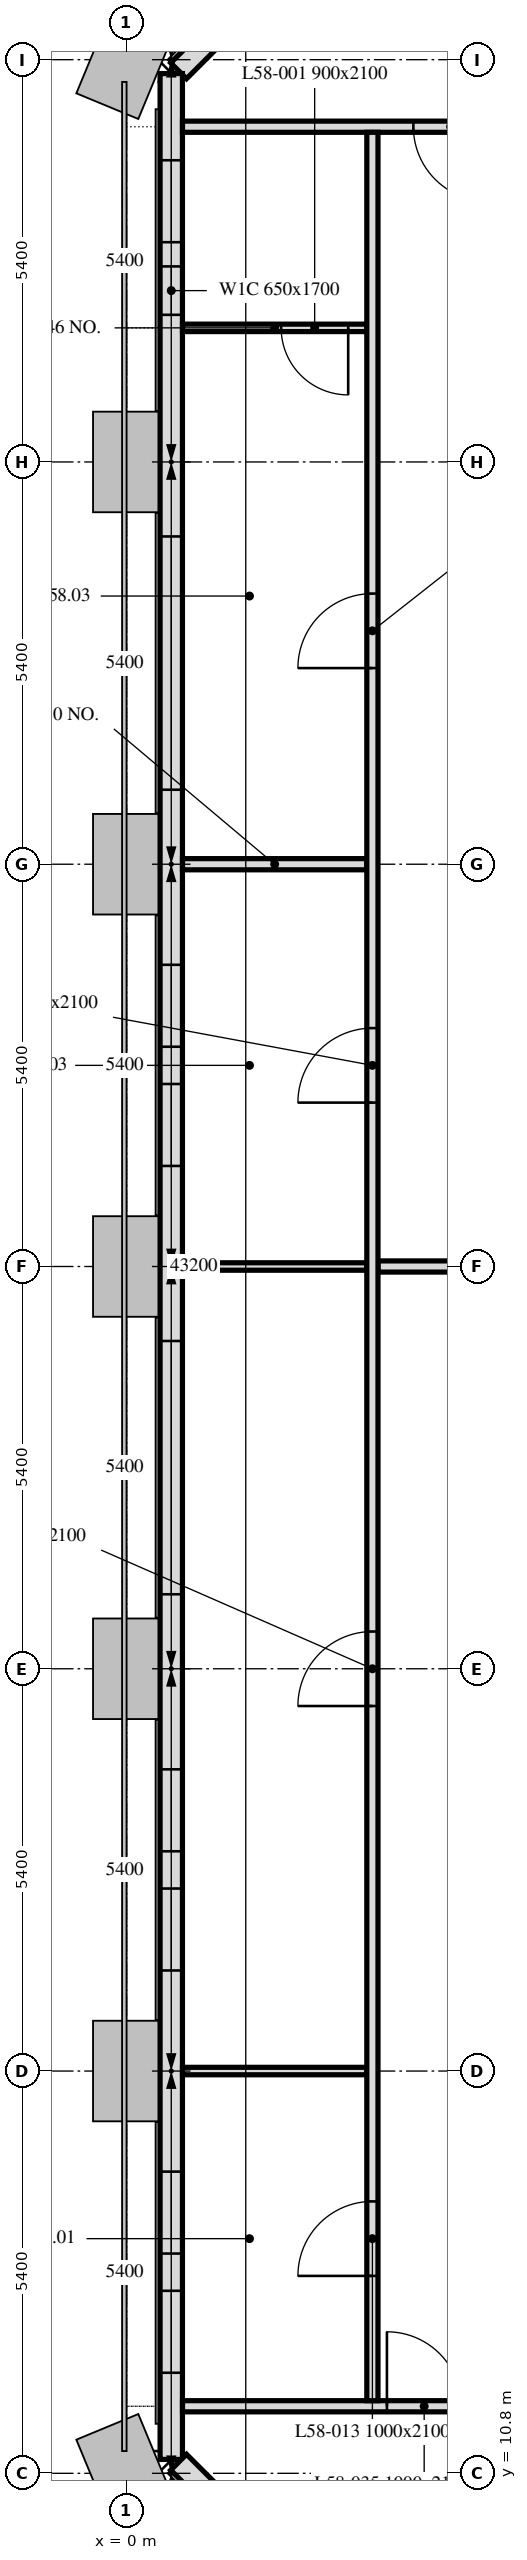
"""IFC4 building model, lengths in metres.
Left out: names, types, materials, properties, quantities, classifications, styles, units other than length and angle.
Written with IfcOpenShell. Run it as: python <this file> out.ifc"""

import sys

from ifc_helpers import new_model, si_unit, direction, frame, frame_2d, origin, place, context, subcontext, project, spatial, rectangle, extrude, element, fill, save


model = new_model("IFC4")
c1 = context("Model", 3, precision=1e-05, world=origin(), true_north=direction((0.0, 1.0)))
c2 = subcontext(c1, "Body", "Model", "MODEL_VIEW")
j1 = project(units=[si_unit("LENGTHUNIT", "METRE"), si_unit("PLANEANGLEUNIT", "RADIAN")], contexts=[c1])
p1 = place(None, origin())
s1 = spatial("IfcSite", under=j1, at=p1, CompositionType="ELEMENT")
p2 = place(p1, origin())
s2 = spatial("IfcBuilding", under=s1, at=p2, CompositionType="ELEMENT")
p3 = place(p2, frame((0.0, 0.0, 230.2)))
s3 = spatial("IfcBuildingStorey", under=s2, at=p3, CompositionType="ELEMENT", Elevation=230.2)
p4 = place(p3, frame((5.55, 47.901, 0.0), z_axis=(0.0, 0.0, 1.0), x_axis=(-0.707106781187, -0.707106781187, 0.0)))
e1 = element("IfcWall", 1, at=p4, inside=s3, PredefinedType="SOLIDWALL", context=c2, shape_type="SweptSolid", body=[
    extrude(rectangle(XDim=6.86, YDim=0.3, at=frame_2d((3.43, 0.0))), origin(), (0.0, 0.0, 1.0), 2.8),
])
p5 = place(p4, frame((1.28, 0.0, 0.9)))
e2 = element("IfcOpeningElement", 2, at=p5, cuts=e1, PredefinedType="OPENING", context=c2, shape_type="SweptSolid", body=[
    extrude(rectangle(XDim=1.1, YDim=1.7, at=frame_2d((0.55, 0.85))), frame((0.0, 0.16, 0.0), z_axis=(0.0, -1.0, 0.0), x_axis=(1.0, 0.0, 0.0)), (0.0, 0.0, 1.0), 0.32),
])
p6 = place(p4, frame((4.48, 0.0, 0.9)))
e3 = element("IfcOpeningElement", 3, at=p6, cuts=e1, PredefinedType="OPENING", context=c2, shape_type="SweptSolid", body=[
    extrude(rectangle(XDim=1.1, YDim=1.7, at=frame_2d((0.55, 0.85))), frame((0.0, 0.16, 0.0), z_axis=(0.0, -1.0, 0.0), x_axis=(1.0, 0.0, 0.0)), (0.0, 0.0, 1.0), 0.32),
])
p7 = place(p3, frame((0.6, 43.014, 0.0), z_axis=(0.0, 0.0, 1.0), x_axis=(0.0, -1.0, 0.0)))
e4 = element("IfcWall", 4, at=p7, inside=s3, PredefinedType="SOLIDWALL", context=c2, shape_type="SweptSolid", body=[
    extrude(rectangle(XDim=32.027, YDim=0.3, at=frame_2d((16.014, 0.0))), origin(), (0.0, 0.0, 1.0), 2.8),
])
p8 = place(p7, frame((1.164, 0.0, 0.9)))
e5 = element("IfcOpeningElement", 5, at=p8, cuts=e4, PredefinedType="OPENING", context=c2, shape_type="SweptSolid", body=[
    extrude(rectangle(XDim=1.1, YDim=1.7, at=frame_2d((0.55, 0.85))), frame((0.0, 0.16, 0.0), z_axis=(0.0, -1.0, 0.0), x_axis=(1.0, 0.0, 0.0)), (0.0, 0.0, 1.0), 0.32),
])
p9 = place(p7, frame((2.589, 0.0, 0.9)))
e6 = element("IfcOpeningElement", 6, at=p9, cuts=e4, PredefinedType="OPENING", context=c2, shape_type="SweptSolid", body=[
    extrude(rectangle(XDim=0.65, YDim=1.7, at=frame_2d((0.325, 0.85))), frame((0.0, 0.16, 0.0), z_axis=(0.0, -1.0, 0.0), x_axis=(1.0, 0.0, 0.0)), (0.0, 0.0, 1.0), 0.32),
])
p10 = place(p7, frame((6.214, 0.0, 0.9)))
e7 = element("IfcOpeningElement", 7, at=p10, cuts=e4, PredefinedType="OPENING", context=c2, shape_type="SweptSolid", body=[
    extrude(rectangle(XDim=3.4, YDim=1.7, at=frame_2d((1.7, 0.85))), frame((0.0, 0.16, 0.0), z_axis=(0.0, -1.0, 0.0), x_axis=(1.0, 0.0, 0.0)), (0.0, 0.0, 1.0), 0.32),
])
p11 = place(p7, frame((11.964, 0.0, 0.9)))
e8 = element("IfcOpeningElement", 8, at=p11, cuts=e4, PredefinedType="OPENING", context=c2, shape_type="SweptSolid", body=[
    extrude(rectangle(XDim=1.1, YDim=1.7, at=frame_2d((0.55, 0.85))), frame((0.0, 0.16, 0.0), z_axis=(0.0, -1.0, 0.0), x_axis=(1.0, 0.0, 0.0)), (0.0, 0.0, 1.0), 0.32),
])
p12 = place(p7, frame((13.564, 0.0, 0.9)))
e9 = element("IfcOpeningElement", 9, at=p12, cuts=e4, PredefinedType="OPENING", context=c2, shape_type="SweptSolid", body=[
    extrude(rectangle(XDim=1.1, YDim=1.7, at=frame_2d((0.55, 0.85))), frame((0.0, 0.16, 0.0), z_axis=(0.0, -1.0, 0.0), x_axis=(1.0, 0.0, 0.0)), (0.0, 0.0, 1.0), 0.32),
])
p13 = place(p7, frame((17.014, 0.0, 0.9)))
e10 = element("IfcOpeningElement", 10, at=p13, cuts=e4, PredefinedType="OPENING", context=c2, shape_type="SweptSolid", body=[
    extrude(rectangle(XDim=3.4, YDim=1.7, at=frame_2d((1.7, 0.85))), frame((0.0, 0.16, 0.0), z_axis=(0.0, -1.0, 0.0), x_axis=(1.0, 0.0, 0.0)), (0.0, 0.0, 1.0), 0.32),
])
p14 = place(p7, frame((22.764, 0.0, 0.9)))
e11 = element("IfcOpeningElement", 11, at=p14, cuts=e4, PredefinedType="OPENING", context=c2, shape_type="SweptSolid", body=[
    extrude(rectangle(XDim=1.1, YDim=1.7, at=frame_2d((0.55, 0.85))), frame((0.0, 0.16, 0.0), z_axis=(0.0, -1.0, 0.0), x_axis=(1.0, 0.0, 0.0)), (0.0, 0.0, 1.0), 0.32),
])
p15 = place(p7, frame((24.364, 0.0, 0.9)))
e12 = element("IfcOpeningElement", 12, at=p15, cuts=e4, PredefinedType="OPENING", context=c2, shape_type="SweptSolid", body=[
    extrude(rectangle(XDim=1.1, YDim=1.7, at=frame_2d((0.55, 0.85))), frame((0.0, 0.16, 0.0), z_axis=(0.0, -1.0, 0.0), x_axis=(1.0, 0.0, 0.0)), (0.0, 0.0, 1.0), 0.32),
])
p16 = place(p7, frame((28.164, 0.0, 0.9)))
e13 = element("IfcOpeningElement", 13, at=p16, cuts=e4, PredefinedType="OPENING", context=c2, shape_type="SweptSolid", body=[
    extrude(rectangle(XDim=1.1, YDim=1.7, at=frame_2d((0.55, 0.85))), frame((0.0, 0.16, 0.0), z_axis=(0.0, -1.0, 0.0), x_axis=(1.0, 0.0, 0.0)), (0.0, 0.0, 1.0), 0.32),
])
p17 = place(p7, frame((29.764, 0.0, 0.9)))
e14 = element("IfcOpeningElement", 14, at=p17, cuts=e4, PredefinedType="OPENING", context=c2, shape_type="SweptSolid", body=[
    extrude(rectangle(XDim=1.1, YDim=1.7, at=frame_2d((0.55, 0.85))), frame((0.0, 0.16, 0.0), z_axis=(0.0, -1.0, 0.0), x_axis=(1.0, 0.0, 0.0)), (0.0, 0.0, 1.0), 0.32),
])
p18 = place(p3, frame((0.699, 10.949, 0.0), z_axis=(0.0, 0.0, 1.0), x_axis=(0.707106781187, -0.707106781187, 0.0)))
e15 = element("IfcWall", 15, at=p18, inside=s3, PredefinedType="SOLIDWALL", context=c2, shape_type="SweptSolid", body=[
    extrude(rectangle(XDim=6.86, YDim=0.3, at=frame_2d((3.43, 0.0))), origin(), (0.0, 0.0, 1.0), 2.8),
])
p19 = place(p18, frame((1.28, 0.0, 0.9)))
e16 = element("IfcOpeningElement", 16, at=p19, cuts=e15, PredefinedType="OPENING", context=c2, shape_type="SweptSolid", body=[
    extrude(rectangle(XDim=1.1, YDim=1.7, at=frame_2d((0.55, 0.85))), frame((0.0, 0.16, 0.0), z_axis=(0.0, -1.0, 0.0), x_axis=(1.0, 0.0, 0.0)), (0.0, 0.0, 1.0), 0.32),
])
p20 = place(p18, frame((4.48, 0.0, 0.9)))
e17 = element("IfcOpeningElement", 17, at=p20, cuts=e15, PredefinedType="OPENING", context=c2, shape_type="SweptSolid", body=[
    extrude(rectangle(XDim=1.1, YDim=1.7, at=frame_2d((0.55, 0.85))), frame((0.0, 0.16, 0.0), z_axis=(0.0, -1.0, 0.0), x_axis=(1.0, 0.0, 0.0)), (0.0, 0.0, 1.0), 0.32),
])
p21 = place(p3, frame((0.751, 32.4, 0.0), z_axis=(0.0, 0.0, 1.0), x_axis=(1.0, 0.0, 0.0)))
e18 = element("IfcWall", 18, at=p21, inside=s3, PredefinedType="PARTITIONING", context=c2, shape_type="SweptSolid", body=[
    extrude(rectangle(XDim=2.474, YDim=0.15, at=frame_2d((1.237, 0.0))), origin(), (0.0, 0.0, 1.0), 2.2),
])
p22 = place(p3, frame((3.225, 39.6, 0.0), z_axis=(0.0, 0.0, 1.0), x_axis=(-1.0, 0.0, 0.0)))
e19 = element("IfcWall", 19, at=p22, inside=s3, PredefinedType="PARTITIONING", context=c2, shape_type="SweptSolid", body=[
    extrude(rectangle(XDim=2.474, YDim=0.1, at=frame_2d((1.237, 0.0))), origin(), (0.0, 0.0, 1.0), 2.8),
])
p23 = place(p22, frame((0.25, 0.0, 0.0)))
e20 = element("IfcOpeningElement", 20, at=p23, cuts=e19, PredefinedType="OPENING", context=c2, shape_type="SweptSolid", body=[
    extrude(rectangle(XDim=0.9, YDim=2.1, at=frame_2d((0.45, 1.05))), frame((0.0, 0.05, 0.0), z_axis=(0.0, -1.0, 0.0), x_axis=(1.0, 0.0, 0.0)), (0.0, 0.0, 1.0), 0.1),
])
p24 = place(p3, frame((42.449, 42.3, 0.0), z_axis=(0.0, 0.0, 1.0), x_axis=(-1.0, 0.0, 0.0)))
e21 = element("IfcWall", 21, at=p24, inside=s3, PredefinedType="PARTITIONING", context=c2, shape_type="SweptSolid", body=[
    extrude(rectangle(XDim=41.698, YDim=0.15, at=frame_2d((20.849, 0.0))), origin(), (0.0, 0.0, 1.0), 2.2),
])
p25 = place(p24, frame((1.132, 0.0, 0.0)))
e22 = element("IfcOpeningElement", 22, at=p25, cuts=e21, PredefinedType="OPENING", context=c2, shape_type="SweptSolid", body=[
    extrude(rectangle(XDim=1.0, YDim=2.1, at=frame_2d((0.5, 1.05))), frame((0.0, 0.075, 0.0), z_axis=(0.0, -1.0, 0.0), x_axis=(1.0, 0.0, 0.0)), (0.0, 0.0, 1.0), 0.15),
])
p26 = place(p24, frame((13.049, 0.0, 0.0)))
e23 = element("IfcOpeningElement", 23, at=p26, cuts=e21, PredefinedType="OPENING", context=c2, shape_type="SweptSolid", body=[
    extrude(rectangle(XDim=1.0, YDim=2.1, at=frame_2d((0.5, 1.05))), frame((0.0, 0.075, 0.0), z_axis=(0.0, -1.0, 0.0), x_axis=(1.0, 0.0, 0.0)), (0.0, 0.0, 1.0), 0.15),
])
p27 = place(p24, frame((18.449, 0.0, 0.0)))
e24 = element("IfcOpeningElement", 24, at=p27, cuts=e21, PredefinedType="OPENING", context=c2, shape_type="SweptSolid", body=[
    extrude(rectangle(XDim=1.0, YDim=2.1, at=frame_2d((0.5, 1.05))), frame((0.0, 0.075, 0.0), z_axis=(0.0, -1.0, 0.0), x_axis=(1.0, 0.0, 0.0)), (0.0, 0.0, 1.0), 0.15),
])
p28 = place(p24, frame((23.049, 0.0, 0.0)))
e25 = element("IfcOpeningElement", 25, at=p28, cuts=e21, PredefinedType="OPENING", context=c2, shape_type="SweptSolid", body=[
    extrude(rectangle(XDim=1.0, YDim=2.1, at=frame_2d((0.5, 1.05))), frame((0.0, 0.075, 0.0), z_axis=(0.0, -1.0, 0.0), x_axis=(1.0, 0.0, 0.0)), (0.0, 0.0, 1.0), 0.15),
])
p29 = place(p24, frame((37.599, 0.0, 0.0)))
e26 = element("IfcOpeningElement", 26, at=p29, cuts=e21, PredefinedType="OPENING", context=c2, shape_type="SweptSolid", body=[
    extrude(rectangle(XDim=1.0, YDim=2.1, at=frame_2d((0.5, 1.05))), frame((0.0, 0.075, 0.0), z_axis=(0.0, -1.0, 0.0), x_axis=(1.0, 0.0, 0.0)), (0.0, 0.0, 1.0), 0.15),
])
p30 = place(p3, frame((0.751, 27.0, 0.0), z_axis=(0.0, 0.0, 1.0), x_axis=(1.0, 0.0, 0.0)))
e27 = element("IfcWall", 27, at=p30, inside=s3, PredefinedType="PARTITIONING", context=c2, shape_type="SweptSolid", body=[
    extrude(rectangle(XDim=2.474, YDim=0.1, at=frame_2d((1.237, 0.0))), origin(), (0.0, 0.0, 1.0), 2.2),
])
p31 = place(p3, frame((3.375, 27.0, 0.0), z_axis=(0.0, 0.0, 1.0), x_axis=(1.0, 0.0, 0.0)))
e28 = element("IfcWall", 28, at=p31, inside=s3, PredefinedType="PARTITIONING", context=c2, shape_type="SweptSolid", body=[
    extrude(rectangle(XDim=2.025, YDim=0.15, at=frame_2d((1.012, 0.0))), origin(), (0.0, 0.0, 1.0), 2.2),
])
p32 = place(p3, frame((3.225, 16.2, 0.0), z_axis=(0.0, 0.0, 1.0), x_axis=(-1.0, 0.0, 0.0)))
e29 = element("IfcWall", 29, at=p32, inside=s3, PredefinedType="PARTITIONING", context=c2, shape_type="SweptSolid", body=[
    extrude(rectangle(XDim=2.474, YDim=0.1, at=frame_2d((1.237, 0.0))), origin(), (0.0, 0.0, 1.0), 2.2),
])
p33 = place(p3, frame((0.751, 11.7, 0.0), z_axis=(0.0, 0.0, 1.0), x_axis=(1.0, 0.0, 0.0)))
e30 = element("IfcWall", 30, at=p33, inside=s3, PredefinedType="PARTITIONING", context=c2, shape_type="SweptSolid", body=[
    extrude(rectangle(XDim=41.698, YDim=0.15, at=frame_2d((20.849, 0.0))), origin(), (0.0, 0.0, 1.0), 2.2),
])
p34 = place(p33, frame((33.866, 0.0, 0.0)))
e31 = element("IfcOpeningElement", 31, at=p34, cuts=e30, PredefinedType="OPENING", context=c2, shape_type="SweptSolid", body=[
    extrude(rectangle(XDim=1.0, YDim=2.1, at=frame_2d((0.5, 1.05))), frame((0.0, 0.075, 0.0), z_axis=(0.0, -1.0, 0.0), x_axis=(1.0, 0.0, 0.0)), (0.0, 0.0, 1.0), 0.15),
])
p35 = place(p33, frame((28.432, 0.0, 0.0)))
e32 = element("IfcOpeningElement", 32, at=p35, cuts=e30, PredefinedType="OPENING", context=c2, shape_type="SweptSolid", body=[
    extrude(rectangle(XDim=1.0, YDim=2.1, at=frame_2d((0.5, 1.05))), frame((0.0, 0.075, 0.0), z_axis=(0.0, -1.0, 0.0), x_axis=(1.0, 0.0, 0.0)), (0.0, 0.0, 1.0), 0.15),
])
p36 = place(p33, frame((12.266, 0.0, 0.0)))
e33 = element("IfcOpeningElement", 33, at=p36, cuts=e30, PredefinedType="OPENING", context=c2, shape_type="SweptSolid", body=[
    extrude(rectangle(XDim=1.0, YDim=2.1, at=frame_2d((0.5, 1.05))), frame((0.0, 0.075, 0.0), z_axis=(0.0, -1.0, 0.0), x_axis=(1.0, 0.0, 0.0)), (0.0, 0.0, 1.0), 0.15),
])
p37 = place(p33, frame((2.744, 0.0, 0.0)))
e34 = element("IfcOpeningElement", 34, at=p37, cuts=e30, PredefinedType="OPENING", context=c2, shape_type="SweptSolid", body=[
    extrude(rectangle(XDim=1.0, YDim=2.1, at=frame_2d((0.5, 1.05))), frame((0.0, 0.075, 0.0), z_axis=(0.0, -1.0, 0.0), x_axis=(1.0, 0.0, 0.0)), (0.0, 0.0, 1.0), 0.15),
])
p38 = place(p3, frame((3.3, 11.775, 0.0), z_axis=(0.0, 0.0, 1.0), x_axis=(0.0, 1.0, 0.0)))
e35 = element("IfcWall", 35, at=p38, inside=s3, PredefinedType="PARTITIONING", context=c2, shape_type="SweptSolid", body=[
    extrude(rectangle(XDim=30.45, YDim=0.15, at=frame_2d((15.225, 0.0))), origin(), (0.0, 0.0, 1.0), 2.2),
])
p39 = place(p38, frame((17.425, 0.0, 0.0)))
e36 = element("IfcOpeningElement", 36, at=p39, cuts=e35, PredefinedType="OPENING", context=c2, shape_type="SweptSolid", body=[
    extrude(rectangle(XDim=1.0, YDim=2.1, at=frame_2d((0.5, 1.05))), frame((0.0, 0.075, 0.0), z_axis=(0.0, -1.0, 0.0), x_axis=(1.0, 0.0, 0.0)), (0.0, 0.0, 1.0), 0.15),
])
p40 = place(p38, frame((1.675, 0.0, 0.0)))
e37 = element("IfcOpeningElement", 37, at=p40, cuts=e35, PredefinedType="OPENING", context=c2, shape_type="SweptSolid", body=[
    extrude(rectangle(XDim=1.0, YDim=2.1, at=frame_2d((0.5, 1.05))), frame((0.0, 0.075, 0.0), z_axis=(0.0, -1.0, 0.0), x_axis=(1.0, 0.0, 0.0)), (0.0, 0.0, 1.0), 0.15),
])
p41 = place(p38, frame((9.325, 0.0, 0.0)))
e38 = element("IfcOpeningElement", 38, at=p41, cuts=e35, PredefinedType="OPENING", context=c2, shape_type="SweptSolid", body=[
    extrude(rectangle(XDim=1.0, YDim=2.1, at=frame_2d((0.5, 1.05))), frame((0.0, 0.075, 0.0), z_axis=(0.0, -1.0, 0.0), x_axis=(1.0, 0.0, 0.0)), (0.0, 0.0, 1.0), 0.15),
])
p42 = place(p38, frame((23.258, 0.0, 0.0)))
e39 = element("IfcOpeningElement", 39, at=p42, cuts=e35, PredefinedType="OPENING", context=c2, shape_type="SweptSolid", body=[
    extrude(rectangle(XDim=1.0, YDim=2.1, at=frame_2d((0.5, 1.05))), frame((0.0, 0.075, 0.0), z_axis=(0.0, -1.0, 0.0), x_axis=(1.0, 0.0, 0.0)), (0.0, 0.0, 1.0), 0.15),
])
p43 = place(p8, origin())
e40 = element("IfcWindow", 40, at=p43, inside=s3, PartitioningType="SINGLE_PANEL", PredefinedType="WINDOW", context=c2, shape_type="SweptSolid", body=[
    extrude(rectangle(XDim=1.1, YDim=1.7, at=frame_2d((0.55, 0.85))), frame((0.0, 0.03, 0.0), z_axis=(0.0, -1.0, 0.0), x_axis=(1.0, 0.0, 0.0)), (0.0, 0.0, 1.0), 0.06),
])
fill(e5, e40)
p44 = place(p9, origin())
e41 = element("IfcWindow", 41, at=p44, inside=s3, PartitioningType="SINGLE_PANEL", PredefinedType="WINDOW", context=c2, shape_type="SweptSolid", body=[
    extrude(rectangle(XDim=0.65, YDim=1.7, at=frame_2d((0.325, 0.85))), frame((0.0, 0.03, 0.0), z_axis=(0.0, -1.0, 0.0), x_axis=(1.0, 0.0, 0.0)), (0.0, 0.0, 1.0), 0.06),
])
fill(e6, e41)
p45 = place(p10, origin())
e42 = element("IfcWindow", 42, at=p45, inside=s3, PartitioningType="SINGLE_PANEL", PredefinedType="WINDOW", context=c2, shape_type="SweptSolid", body=[
    extrude(rectangle(XDim=3.4, YDim=1.7, at=frame_2d((1.7, 0.85))), frame((0.0, 0.03, 0.0), z_axis=(0.0, -1.0, 0.0), x_axis=(1.0, 0.0, 0.0)), (0.0, 0.0, 1.0), 0.06),
])
fill(e7, e42)
p46 = place(p11, origin())
e43 = element("IfcWindow", 43, at=p46, inside=s3, PartitioningType="SINGLE_PANEL", PredefinedType="WINDOW", context=c2, shape_type="SweptSolid", body=[
    extrude(rectangle(XDim=1.1, YDim=1.7, at=frame_2d((0.55, 0.85))), frame((0.0, 0.03, 0.0), z_axis=(0.0, -1.0, 0.0), x_axis=(1.0, 0.0, 0.0)), (0.0, 0.0, 1.0), 0.06),
])
fill(e8, e43)
p47 = place(p12, origin())
e44 = element("IfcWindow", 44, at=p47, inside=s3, PartitioningType="SINGLE_PANEL", PredefinedType="WINDOW", context=c2, shape_type="SweptSolid", body=[
    extrude(rectangle(XDim=1.1, YDim=1.7, at=frame_2d((0.55, 0.85))), frame((0.0, 0.03, 0.0), z_axis=(0.0, -1.0, 0.0), x_axis=(1.0, 0.0, 0.0)), (0.0, 0.0, 1.0), 0.06),
])
fill(e9, e44)
p48 = place(p13, origin())
e45 = element("IfcWindow", 45, at=p48, inside=s3, PartitioningType="SINGLE_PANEL", PredefinedType="WINDOW", context=c2, shape_type="SweptSolid", body=[
    extrude(rectangle(XDim=3.4, YDim=1.7, at=frame_2d((1.7, 0.85))), frame((0.0, 0.03, 0.0), z_axis=(0.0, -1.0, 0.0), x_axis=(1.0, 0.0, 0.0)), (0.0, 0.0, 1.0), 0.06),
])
fill(e10, e45)
p49 = place(p14, origin())
e46 = element("IfcWindow", 46, at=p49, inside=s3, PartitioningType="SINGLE_PANEL", PredefinedType="WINDOW", context=c2, shape_type="SweptSolid", body=[
    extrude(rectangle(XDim=1.1, YDim=1.7, at=frame_2d((0.55, 0.85))), frame((0.0, 0.03, 0.0), z_axis=(0.0, -1.0, 0.0), x_axis=(1.0, 0.0, 0.0)), (0.0, 0.0, 1.0), 0.06),
])
fill(e11, e46)
p50 = place(p15, origin())
e47 = element("IfcWindow", 47, at=p50, inside=s3, PartitioningType="SINGLE_PANEL", PredefinedType="WINDOW", context=c2, shape_type="SweptSolid", body=[
    extrude(rectangle(XDim=1.1, YDim=1.7, at=frame_2d((0.55, 0.85))), frame((0.0, 0.03, 0.0), z_axis=(0.0, -1.0, 0.0), x_axis=(1.0, 0.0, 0.0)), (0.0, 0.0, 1.0), 0.06),
])
fill(e12, e47)
p51 = place(p16, origin())
e48 = element("IfcWindow", 48, at=p51, inside=s3, PartitioningType="SINGLE_PANEL", PredefinedType="WINDOW", context=c2, shape_type="SweptSolid", body=[
    extrude(rectangle(XDim=1.1, YDim=1.7, at=frame_2d((0.55, 0.85))), frame((0.0, 0.03, 0.0), z_axis=(0.0, -1.0, 0.0), x_axis=(1.0, 0.0, 0.0)), (0.0, 0.0, 1.0), 0.06),
])
fill(e13, e48)
p52 = place(p17, origin())
e49 = element("IfcWindow", 49, at=p52, inside=s3, PartitioningType="SINGLE_PANEL", PredefinedType="WINDOW", context=c2, shape_type="SweptSolid", body=[
    extrude(rectangle(XDim=1.1, YDim=1.7, at=frame_2d((0.55, 0.85))), frame((0.0, 0.03, 0.0), z_axis=(0.0, -1.0, 0.0), x_axis=(1.0, 0.0, 0.0)), (0.0, 0.0, 1.0), 0.06),
])
fill(e14, e49)
p53 = place(p23, origin())
e50 = element("IfcDoor", 50, at=p53, inside=s3, OperationType="SINGLE_SWING_RIGHT", PredefinedType="DOOR", context=c2, shape_type="SweptSolid", body=[
    extrude(rectangle(XDim=0.9, YDim=2.1, at=frame_2d((0.45, 1.05))), frame((0.0, 0.025, 0.0), z_axis=(0.0, -1.0, 0.0), x_axis=(1.0, 0.0, 0.0)), (0.0, 0.0, 1.0), 0.05),
])
fill(e20, e50)
p54 = place(p39, origin())
e51 = element("IfcDoor", 51, at=p54, inside=s3, OperationType="SINGLE_SWING_RIGHT", PredefinedType="DOOR", context=c2, shape_type="SweptSolid", body=[
    extrude(rectangle(XDim=1.0, YDim=2.1, at=frame_2d((0.5, 1.05))), frame((0.0, 0.025, 0.0), z_axis=(0.0, -1.0, 0.0), x_axis=(1.0, 0.0, 0.0)), (0.0, 0.0, 1.0), 0.05),
])
fill(e36, e51)
p55 = place(p40, origin())
e52 = element("IfcDoor", 52, at=p55, inside=s3, OperationType="SINGLE_SWING_LEFT", PredefinedType="DOOR", context=c2, shape_type="SweptSolid", body=[
    extrude(rectangle(XDim=1.0, YDim=2.1, at=frame_2d((0.5, 1.05))), frame((0.0, 0.025, 0.0), z_axis=(0.0, -1.0, 0.0), x_axis=(1.0, 0.0, 0.0)), (0.0, 0.0, 1.0), 0.05),
])
fill(e37, e52)
p56 = place(p41, origin())
e53 = element("IfcDoor", 53, at=p56, inside=s3, OperationType="SINGLE_SWING_RIGHT", PredefinedType="DOOR", context=c2, shape_type="SweptSolid", body=[
    extrude(rectangle(XDim=1.0, YDim=2.1, at=frame_2d((0.5, 1.05))), frame((0.0, 0.025, 0.0), z_axis=(0.0, -1.0, 0.0), x_axis=(1.0, 0.0, 0.0)), (0.0, 0.0, 1.0), 0.05),
])
fill(e38, e53)
p57 = place(p42, origin())
e54 = element("IfcDoor", 54, at=p57, inside=s3, OperationType="SINGLE_SWING_LEFT", PredefinedType="DOOR", context=c2, shape_type="SweptSolid", body=[
    extrude(rectangle(XDim=1.0, YDim=2.1, at=frame_2d((0.5, 1.05))), frame((0.0, 0.025, 0.0), z_axis=(0.0, -1.0, 0.0), x_axis=(1.0, 0.0, 0.0)), (0.0, 0.0, 1.0), 0.05),
])
fill(e39, e54)
p58 = place(p29, origin())
e55 = element("IfcDoor", 55, at=p58, inside=s3, OperationType="SINGLE_SWING_RIGHT", PredefinedType="DOOR", context=c2, shape_type="SweptSolid", body=[
    extrude(rectangle(XDim=1.0, YDim=2.1, at=frame_2d((0.5, 1.05))), frame((0.0, 0.025, 0.0), z_axis=(0.0, -1.0, 0.0), x_axis=(1.0, 0.0, 0.0)), (0.0, 0.0, 1.0), 0.05),
])
fill(e26, e55)
p59 = place(p37, origin())
e56 = element("IfcDoor", 56, at=p59, inside=s3, OperationType="SINGLE_SWING_RIGHT", PredefinedType="DOOR", context=c2, shape_type="SweptSolid", body=[
    extrude(rectangle(XDim=1.0, YDim=2.1, at=frame_2d((0.5, 1.05))), frame((0.0, 0.025, 0.0), z_axis=(0.0, -1.0, 0.0), x_axis=(1.0, 0.0, 0.0)), (0.0, 0.0, 1.0), 0.05),
])
fill(e34, e56)
save(model, sys.argv[1])
